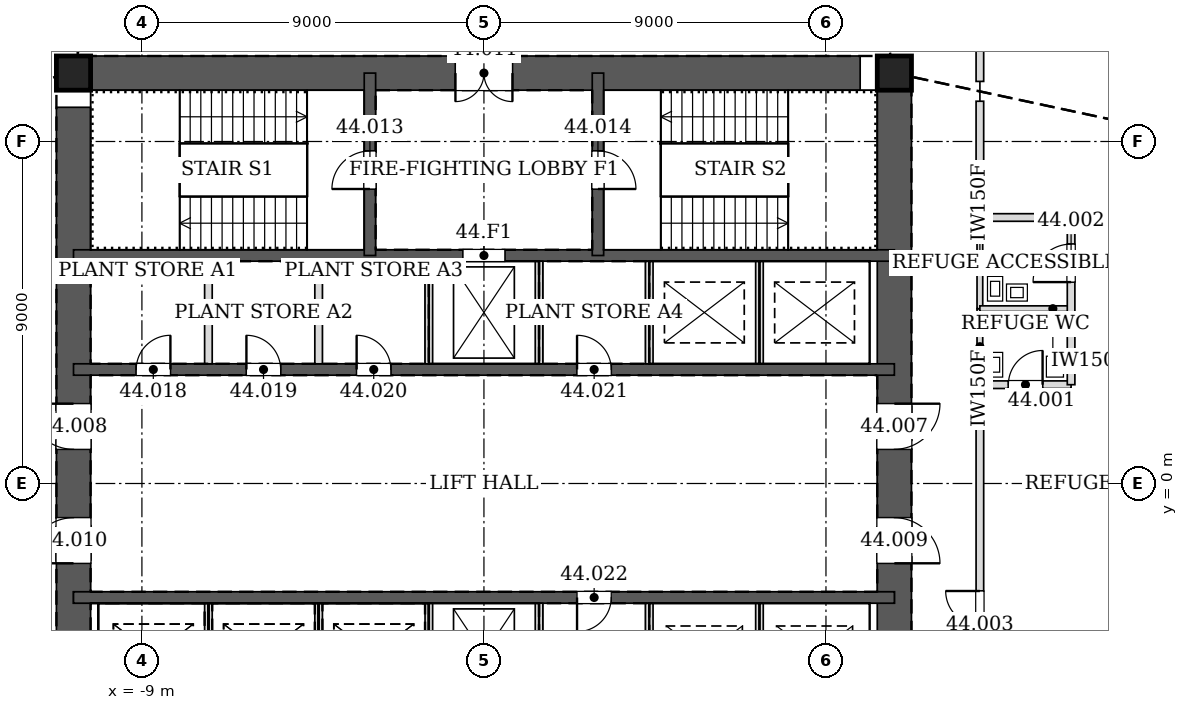
"""IFC4 building model, lengths in metres.
Left out: names, types, materials, properties, quantities, classifications, styles, units other than length and angle.
Written with IfcOpenShell. Run it as: python <this file> out.ifc"""

import sys

from ifc_helpers import new_model, si_unit, direction, frame, frame_2d, origin, origin_2d, place, context, subcontext, project, spatial, rectangle, hollow_rectangle, extrude, element, fill, save


model = new_model("IFC4")
c1 = context("Model", 3, precision=1e-05, world=origin(), true_north=direction((0.0, 1.0)))
c2 = subcontext(c1, "Body", "Model", "MODEL_VIEW")
j1 = project(units=[si_unit("LENGTHUNIT", "METRE"), si_unit("PLANEANGLEUNIT", "RADIAN")], contexts=[c1])
p1 = place(None, origin())
s1 = spatial("IfcSite", under=j1, at=p1, CompositionType="ELEMENT")
p2 = place(p1, origin())
s2 = spatial("IfcBuilding", under=s1, at=p2, CompositionType="ELEMENT")
p3 = place(p2, frame((0.0, 0.0, 193.5)))
s3 = spatial("IfcBuildingStorey", under=s2, at=p3, CompositionType="ELEMENT", Elevation=193.5)
for number, where, z_axis, x_axis in (
    (1, (10.8, 10.8, 0.0), (0.0, 0.0, 1.0), (1.0, 0.0, 0.0)),
    (2, (-10.8, 10.8, 0.0), (0.0, 0.0, 1.0), (1.0, 0.0, 0.0)),
):
    element("IfcColumn", number, at=place(p3, frame(where, z_axis=z_axis, x_axis=x_axis)), inside=s3, PredefinedType="COLUMN", context=c2, shape_type="SweptSolid", body=[
        extrude(hollow_rectangle(XDim=0.9, YDim=0.9, WallThickness=0.06, at=origin_2d()), origin(), (0.0, 0.0, 1.0), 4.5),
    ])
p4 = place(p3, frame((10.8, -10.8, 0.0), z_axis=(0.0, 0.0, 1.0), x_axis=(0.0, 1.0, 0.0)))
e3 = element("IfcWall", 3, at=p4, inside=s3, PredefinedType="SOLIDWALL", context=c2, shape_type="SweptSolid", body=[
    extrude(rectangle(XDim=21.6, YDim=0.9, at=frame_2d((10.8, 0.0))), origin(), (0.0, 0.0, 1.0), 4.5),
])
p5 = place(p4, frame((11.7, 0.0, 0.0)))
e4 = element("IfcOpeningElement", 4, at=p5, cuts=e3, PredefinedType="OPENING", context=c2, shape_type="SweptSolid", body=[
    extrude(rectangle(XDim=1.2, YDim=2.1, at=frame_2d((0.6, 1.05))), frame((0.0, 0.46, 0.0), z_axis=(0.0, -1.0, 0.0), x_axis=(1.0, 0.0, 0.0)), (0.0, 0.0, 1.0), 0.92),
])
p6 = place(p4, frame((8.7, 0.0, 0.0)))
e5 = element("IfcOpeningElement", 5, at=p6, cuts=e3, PredefinedType="OPENING", context=c2, shape_type="SweptSolid", body=[
    extrude(rectangle(XDim=1.2, YDim=2.1, at=frame_2d((0.6, 1.05))), frame((0.0, 0.46, 0.0), z_axis=(0.0, -1.0, 0.0), x_axis=(1.0, 0.0, 0.0)), (0.0, 0.0, 1.0), 0.92),
])
p7 = place(p3, frame((10.8, 10.8, 0.0), z_axis=(0.0, 0.0, 1.0), x_axis=(-1.0, 0.0, 0.0)))
e6 = element("IfcWall", 6, at=p7, inside=s3, PredefinedType="SOLIDWALL", context=c2, shape_type="SweptSolid", body=[
    extrude(rectangle(XDim=21.6, YDim=0.9, at=frame_2d((10.8, 0.0))), origin(), (0.0, 0.0, 1.0), 4.5),
])
p8 = place(p7, frame((10.05, 0.0, 0.0)))
e7 = element("IfcOpeningElement", 7, at=p8, cuts=e6, PredefinedType="OPENING", context=c2, shape_type="SweptSolid", body=[
    extrude(rectangle(XDim=1.5, YDim=2.1, at=frame_2d((0.75, 1.05))), frame((0.0, 0.46, 0.0), z_axis=(0.0, -1.0, 0.0), x_axis=(1.0, 0.0, 0.0)), (0.0, 0.0, 1.0), 0.92),
])
p9 = place(p3, frame((-10.8, 10.8, 0.0), z_axis=(0.0, 0.0, 1.0), x_axis=(0.0, -1.0, 0.0)))
e8 = element("IfcWall", 8, at=p9, inside=s3, PredefinedType="SOLIDWALL", context=c2, shape_type="SweptSolid", body=[
    extrude(rectangle(XDim=21.6, YDim=0.9, at=frame_2d((10.8, 0.0))), origin(), (0.0, 0.0, 1.0), 4.5),
])
p10 = place(p9, frame((8.7, 0.0, 0.0)))
e9 = element("IfcOpeningElement", 9, at=p10, cuts=e8, PredefinedType="OPENING", context=c2, shape_type="SweptSolid", body=[
    extrude(rectangle(XDim=1.2, YDim=2.1, at=frame_2d((0.6, 1.05))), frame((0.0, 0.46, 0.0), z_axis=(0.0, -1.0, 0.0), x_axis=(1.0, 0.0, 0.0)), (0.0, 0.0, 1.0), 0.92),
])
p11 = place(p9, frame((11.7, 0.0, 0.0)))
e10 = element("IfcOpeningElement", 10, at=p11, cuts=e8, PredefinedType="OPENING", context=c2, shape_type="SweptSolid", body=[
    extrude(rectangle(XDim=1.2, YDim=2.1, at=frame_2d((0.6, 1.05))), frame((0.0, 0.46, 0.0), z_axis=(0.0, -1.0, 0.0), x_axis=(1.0, 0.0, 0.0)), (0.0, 0.0, 1.0), 0.92),
])
p12 = place(p3, frame((-10.8, 3.0, 0.0), z_axis=(0.0, 0.0, 1.0), x_axis=(1.0, 0.0, 0.0)))
e11 = element("IfcWall", 11, at=p12, inside=s3, PredefinedType="SOLIDWALL", context=c2, shape_type="SweptSolid", body=[
    extrude(rectangle(XDim=21.6, YDim=0.3, at=frame_2d((10.8, 0.0))), origin(), (0.0, 0.0, 1.0), 4.5),
])
p13 = place(p12, frame((1.65, 0.0, 0.0)))
e12 = element("IfcOpeningElement", 12, at=p13, cuts=e11, PredefinedType="OPENING", context=c2, shape_type="SweptSolid", body=[
    extrude(rectangle(XDim=0.9, YDim=2.1, at=frame_2d((0.45, 1.05))), frame((0.0, 0.16, 0.0), z_axis=(0.0, -1.0, 0.0), x_axis=(1.0, 0.0, 0.0)), (0.0, 0.0, 1.0), 0.32),
])
p14 = place(p12, frame((4.55, 0.0, 0.0)))
e13 = element("IfcOpeningElement", 13, at=p14, cuts=e11, PredefinedType="OPENING", context=c2, shape_type="SweptSolid", body=[
    extrude(rectangle(XDim=0.9, YDim=2.1, at=frame_2d((0.45, 1.05))), frame((0.0, 0.16, 0.0), z_axis=(0.0, -1.0, 0.0), x_axis=(1.0, 0.0, 0.0)), (0.0, 0.0, 1.0), 0.32),
])
p15 = place(p12, frame((7.45, 0.0, 0.0)))
e14 = element("IfcOpeningElement", 14, at=p15, cuts=e11, PredefinedType="OPENING", context=c2, shape_type="SweptSolid", body=[
    extrude(rectangle(XDim=0.9, YDim=2.1, at=frame_2d((0.45, 1.05))), frame((0.0, 0.16, 0.0), z_axis=(0.0, -1.0, 0.0), x_axis=(1.0, 0.0, 0.0)), (0.0, 0.0, 1.0), 0.32),
])
p16 = place(p12, frame((13.25, 0.0, 0.0)))
e15 = element("IfcOpeningElement", 15, at=p16, cuts=e11, PredefinedType="OPENING", context=c2, shape_type="SweptSolid", body=[
    extrude(rectangle(XDim=0.9, YDim=2.1, at=frame_2d((0.45, 1.05))), frame((0.0, 0.16, 0.0), z_axis=(0.0, -1.0, 0.0), x_axis=(1.0, 0.0, 0.0)), (0.0, 0.0, 1.0), 0.32),
])
p17 = place(p3, frame((-10.8, 6.0, 0.0), z_axis=(0.0, 0.0, 1.0), x_axis=(1.0, 0.0, 0.0)))
e16 = element("IfcWall", 16, at=p17, inside=s3, PredefinedType="SOLIDWALL", context=c2, shape_type="SweptSolid", body=[
    extrude(rectangle(XDim=21.6, YDim=0.3, at=frame_2d((10.8, 0.0))), origin(), (0.0, 0.0, 1.0), 4.5),
])
p18 = place(p17, frame((10.25, 0.0, 0.0)))
e17 = element("IfcOpeningElement", 17, at=p18, cuts=e16, PredefinedType="OPENING", context=c2, shape_type="SweptSolid", body=[
    extrude(rectangle(XDim=1.1, YDim=2.1, at=frame_2d((0.55, 1.05))), frame((0.0, 0.16, 0.0), z_axis=(0.0, -1.0, 0.0), x_axis=(1.0, 0.0, 0.0)), (0.0, 0.0, 1.0), 0.32),
])
p19 = place(p3, frame((-3.0, 6.0, 0.0), z_axis=(0.0, 0.0, 1.0), x_axis=(0.0, 1.0, 0.0)))
e18 = element("IfcWall", 18, at=p19, inside=s3, PredefinedType="SOLIDWALL", context=c2, shape_type="SweptSolid", body=[
    extrude(rectangle(XDim=4.8, YDim=0.3, at=frame_2d((2.4, 0.0))), origin(), (0.0, 0.0, 1.0), 4.5),
])
p20 = place(p19, frame((1.75, 0.0, 0.0)))
e19 = element("IfcOpeningElement", 19, at=p20, cuts=e18, PredefinedType="OPENING", context=c2, shape_type="SweptSolid", body=[
    extrude(rectangle(XDim=1.0, YDim=2.1, at=frame_2d((0.5, 1.05))), frame((0.0, 0.16, 0.0), z_axis=(0.0, -1.0, 0.0), x_axis=(1.0, 0.0, 0.0)), (0.0, 0.0, 1.0), 0.32),
])
p21 = place(p3, frame((3.0, 6.0, 0.0), z_axis=(0.0, 0.0, 1.0), x_axis=(0.0, 1.0, 0.0)))
e20 = element("IfcWall", 20, at=p21, inside=s3, PredefinedType="SOLIDWALL", context=c2, shape_type="SweptSolid", body=[
    extrude(rectangle(XDim=4.8, YDim=0.3, at=frame_2d((2.4, 0.0))), origin(), (0.0, 0.0, 1.0), 4.5),
])
p22 = place(p21, frame((1.75, 0.0, 0.0)))
e21 = element("IfcOpeningElement", 21, at=p22, cuts=e20, PredefinedType="OPENING", context=c2, shape_type="SweptSolid", body=[
    extrude(rectangle(XDim=1.0, YDim=2.1, at=frame_2d((0.5, 1.05))), frame((0.0, 0.16, 0.0), z_axis=(0.0, -1.0, 0.0), x_axis=(1.0, 0.0, 0.0)), (0.0, 0.0, 1.0), 0.32),
])
p23 = place(p3, frame((-10.8, -3.0, 0.0), z_axis=(0.0, 0.0, 1.0), x_axis=(1.0, 0.0, 0.0)))
e22 = element("IfcWall", 22, at=p23, inside=s3, PredefinedType="SOLIDWALL", context=c2, shape_type="SweptSolid", body=[
    extrude(rectangle(XDim=21.6, YDim=0.3, at=frame_2d((10.8, 0.0))), origin(), (0.0, 0.0, 1.0), 2.7),
])
p24 = place(p23, frame((13.25, 0.0, 0.0)))
e23 = element("IfcOpeningElement", 23, at=p24, cuts=e22, PredefinedType="OPENING", context=c2, shape_type="SweptSolid", body=[
    extrude(rectangle(XDim=0.9, YDim=2.1, at=frame_2d((0.45, 1.05))), frame((0.0, 0.16, 0.0), z_axis=(0.0, -1.0, 0.0), x_axis=(1.0, 0.0, 0.0)), (0.0, 0.0, 1.0), 0.32),
])
p25 = place(p3, frame((-10.8, -3.0, 2.7), z_axis=(0.0, 0.0, 1.0), x_axis=(1.0, 0.0, 0.0)))
e24 = element("IfcWall", 24, at=p25, inside=s3, PredefinedType="SOLIDWALL", context=c2, shape_type="SweptSolid", body=[
    extrude(rectangle(XDim=21.6, YDim=0.3, at=frame_2d((10.8, 0.0))), origin(), (0.0, 0.0, 1.0), 1.8),
])
p26 = place(p3, frame((13.05, 2.599, 0.0), z_axis=(0.0, 0.0, 1.0), x_axis=(0.0, 1.0, 0.0)))
e25 = element("IfcWall", 25, at=p26, inside=s3, PredefinedType="PARTITIONING", context=c2, shape_type="SweptSolid", body=[
    extrude(rectangle(XDim=2.002, YDim=0.15, at=frame_2d((1.001, 0.0))), origin(), (0.0, 0.0, 1.0), 4.25),
])
p27 = place(p3, frame((13.05, 4.599, 0.0), z_axis=(0.0, 0.0, 1.0), x_axis=(0.0, 1.0, 0.0)))
e26 = element("IfcWall", 26, at=p27, inside=s3, PredefinedType="PARTITIONING", context=c2, shape_type="SweptSolid", body=[
    extrude(rectangle(XDim=2.402, YDim=0.15, at=frame_2d((1.201, 0.0))), origin(), (0.0, 0.0, 1.0), 4.25),
])
p28 = place(p3, frame((13.05, -10.579, 0.0), z_axis=(0.0, 0.0, 1.0), x_axis=(0.0, 1.0, 0.0)))
e27 = element("IfcWall", 27, at=p28, inside=s3, PredefinedType="PARTITIONING", context=c2, shape_type="SweptSolid", body=[
    extrude(rectangle(XDim=13.18, YDim=0.2, at=frame_2d((6.59, 0.0))), origin(), (0.0, 0.0, 1.0), 2.94),
])
p29 = place(p28, frame((5.95, 0.0, 0.0)))
e28 = element("IfcOpeningElement", 28, at=p29, cuts=e27, PredefinedType="OPENING", context=c2, shape_type="SweptSolid", body=[
    extrude(rectangle(XDim=1.8, YDim=2.4, at=frame_2d((0.9, 1.2))), frame((0.0, 0.11, 0.0), z_axis=(0.0, -1.0, 0.0), x_axis=(1.0, 0.0, 0.0)), (0.0, 0.0, 1.0), 0.22),
])
p30 = place(p3, frame((13.05, 6.999, 0.0), z_axis=(0.0, 0.0, 1.0), x_axis=(0.0, 1.0, 0.0)))
e29 = element("IfcWall", 29, at=p30, inside=s3, PredefinedType="PARTITIONING", context=c2, shape_type="SweptSolid", body=[
    extrude(rectangle(XDim=3.06, YDim=0.2, at=frame_2d((1.53, 0.0))), origin(), (0.0, 0.0, 1.0), 3.44),
])
p31 = place(p3, frame((13.05, 10.581, 0.0), z_axis=(0.0, 0.0, 1.0), x_axis=(0.0, 1.0, 0.0)))
e30 = element("IfcWall", 30, at=p31, inside=s3, PredefinedType="PARTITIONING", context=c2, shape_type="SweptSolid", body=[
    extrude(rectangle(XDim=2.469, YDim=0.2, at=frame_2d((1.235, 0.0))), origin(), (0.0, 0.0, 1.0), 3.229),
])
p32 = place(p3, frame((15.45, 4.6, 0.0), z_axis=(0.0, 0.0, 1.0), x_axis=(-1.0, 0.0, 0.0)))
e31 = element("IfcWall", 31, at=p32, inside=s3, PredefinedType="PARTITIONING", context=c2, shape_type="SweptSolid", body=[
    extrude(rectangle(XDim=2.4, YDim=0.15, at=frame_2d((1.2, 0.0))), origin(), (0.0, 0.0, 1.0), 3.478),
])
p33 = place(p3, frame((13.05, 2.6, 0.0), z_axis=(0.0, 0.0, 1.0), x_axis=(1.0, 0.0, 0.0)))
e32 = element("IfcWall", 32, at=p33, inside=s3, PredefinedType="PARTITIONING", context=c2, shape_type="SweptSolid", body=[
    extrude(rectangle(XDim=2.4, YDim=0.2, at=frame_2d((1.2, 0.0))), origin(), (0.0, 0.0, 1.0), 3.478),
])
p34 = place(p33, frame((0.75, 0.0, 0.0)))
e33 = element("IfcOpeningElement", 33, at=p34, cuts=e32, PredefinedType="OPENING", context=c2, shape_type="SweptSolid", body=[
    extrude(rectangle(XDim=0.9, YDim=2.1, at=frame_2d((0.45, 1.05))), frame((0.0, 0.11, 0.0), z_axis=(0.0, -1.0, 0.0), x_axis=(1.0, 0.0, 0.0)), (0.0, 0.0, 1.0), 0.22),
])
p35 = place(p3, frame((15.45, 2.6, 0.0), z_axis=(0.0, 0.0, 1.0), x_axis=(0.0, 1.0, 0.0)))
e34 = element("IfcWall", 34, at=p35, inside=s3, PredefinedType="PARTITIONING", context=c2, shape_type="SweptSolid", body=[
    extrude(rectangle(XDim=4.4, YDim=0.2, at=frame_2d((2.2, 0.0))), origin(), (0.0, 0.0, 1.0), 4.25),
])
p36 = place(p35, frame((2.7, 0.0, 0.0)))
e35 = element("IfcOpeningElement", 35, at=p36, cuts=e34, PredefinedType="OPENING", context=c2, shape_type="SweptSolid", body=[
    extrude(rectangle(XDim=1.0, YDim=2.1, at=frame_2d((0.5, 1.05))), frame((0.0, 0.11, 0.0), z_axis=(0.0, -1.0, 0.0), x_axis=(1.0, 0.0, 0.0)), (0.0, 0.0, 1.0), 0.22),
])
p37 = place(p3, frame((15.45, 7.0, 0.0), z_axis=(0.0, 0.0, 1.0), x_axis=(-1.0, 0.0, 0.0)))
e36 = element("IfcWall", 36, at=p37, inside=s3, PredefinedType="PARTITIONING", context=c2, shape_type="SweptSolid", body=[
    extrude(rectangle(XDim=2.4, YDim=0.2, at=frame_2d((1.2, 0.0))), origin(), (0.0, 0.0, 1.0), 3.478),
])
for number, where, z_axis, x_axis in (
    (37, (-7.25, 3.15, 0.0), (0.0, 0.0, 1.0), (0.0, 1.0, 0.0)),
    (38, (-4.35, 3.15, 0.0), (0.0, 0.0, 1.0), (0.0, 1.0, 0.0)),
    (39, (-1.45, 3.15, 0.0), (0.0, 0.0, 1.0), (0.0, 1.0, 0.0)),
    (40, (1.45, 3.15, 0.0), (0.0, 0.0, 1.0), (0.0, 1.0, 0.0)),
    (41, (4.35, 3.15, 0.0), (0.0, 0.0, 1.0), (0.0, 1.0, 0.0)),
):
    element("IfcWall", number, at=place(p3, frame(where, z_axis=z_axis, x_axis=x_axis)), inside=s3, PredefinedType="PARTITIONING", context=c2, shape_type="SweptSolid", body=[
        extrude(rectangle(XDim=2.7, YDim=0.2, at=frame_2d((1.35, 0.0))), origin(), (0.0, 0.0, 1.0), 4.25),
    ])
for number, where, z_axis, x_axis in (
    (42, (7.25, 3.15, 0.0), (0.0, 0.0, 1.0), (0.0, 1.0, 0.0)),
    (43, (-7.25, -5.85, 0.0), (0.0, 0.0, 1.0), (0.0, 1.0, 0.0)),
    (44, (-4.35, -5.85, 0.0), (0.0, 0.0, 1.0), (0.0, 1.0, 0.0)),
    (45, (-1.45, -5.85, 0.0), (0.0, 0.0, 1.0), (0.0, 1.0, 0.0)),
):
    element("IfcWall", number, at=place(p3, frame(where, z_axis=z_axis, x_axis=x_axis)), inside=s3, PredefinedType="PARTITIONING", context=c2, shape_type="SweptSolid", body=[
        extrude(rectangle(XDim=2.7, YDim=0.2, at=frame_2d((1.35, 0.0))), origin(), (0.0, 0.0, 1.0), 4.5),
    ])
for number, where, z_axis, x_axis in (
    (46, (1.45, -5.85, 0.0), (0.0, 0.0, 1.0), (0.0, 1.0, 0.0)),
    (47, (4.35, -5.85, 0.0), (0.0, 0.0, 1.0), (0.0, 1.0, 0.0)),
):
    element("IfcWall", number, at=place(p3, frame(where, z_axis=z_axis, x_axis=x_axis)), inside=s3, PredefinedType="PARTITIONING", context=c2, shape_type="SweptSolid", body=[
        extrude(rectangle(XDim=2.7, YDim=0.2, at=frame_2d((1.35, 0.0))), origin(), (0.0, 0.0, 1.0), 4.25),
    ])
p38 = place(p3, frame((7.25, -5.85, 0.0), z_axis=(0.0, 0.0, 1.0), x_axis=(0.0, 1.0, 0.0)))
e48 = element("IfcWall", 48, at=p38, inside=s3, PredefinedType="PARTITIONING", context=c2, shape_type="SweptSolid", body=[
    extrude(rectangle(XDim=2.7, YDim=0.2, at=frame_2d((1.35, 0.0))), origin(), (0.0, 0.0, 1.0), 4.5),
])
p39 = place(p34, origin())
e49 = element("IfcDoor", 49, at=p39, inside=s3, OperationType="SINGLE_SWING_RIGHT", PredefinedType="DOOR", context=c2, shape_type="SweptSolid", body=[
    extrude(rectangle(XDim=0.9, YDim=2.1, at=frame_2d((0.45, 1.05))), frame((0.0, 0.025, 0.0), z_axis=(0.0, -1.0, 0.0), x_axis=(1.0, 0.0, 0.0)), (0.0, 0.0, 1.0), 0.05),
])
fill(e33, e49)
p40 = place(p36, origin())
e50 = element("IfcDoor", 50, at=p40, inside=s3, OperationType="SINGLE_SWING_LEFT", PredefinedType="DOOR", context=c2, shape_type="SweptSolid", body=[
    extrude(rectangle(XDim=1.0, YDim=2.1, at=frame_2d((0.5, 1.05))), frame((0.0, 0.025, 0.0), z_axis=(0.0, -1.0, 0.0), x_axis=(1.0, 0.0, 0.0)), (0.0, 0.0, 1.0), 0.05),
])
fill(e35, e50)
p41 = place(p29, origin())
e51 = element("IfcDoor", 51, at=p41, inside=s3, OperationType="DOUBLE_DOOR_SINGLE_SWING", PredefinedType="DOOR", context=c2, shape_type="SweptSolid", body=[
    extrude(rectangle(XDim=1.8, YDim=2.4, at=frame_2d((0.9, 1.2))), frame((0.0, 0.025, 0.0), z_axis=(0.0, -1.0, 0.0), x_axis=(1.0, 0.0, 0.0)), (0.0, 0.0, 1.0), 0.05),
])
fill(e28, e51)
p42 = place(p5, frame((1.2, 0.0, 0.0), z_axis=(0.0, 0.0, 1.0), x_axis=(-1.0, 0.0, 0.0)))
e52 = element("IfcDoor", 52, at=p42, inside=s3, OperationType="SINGLE_SWING_LEFT", PredefinedType="DOOR", context=c2, shape_type="SweptSolid", body=[
    extrude(rectangle(XDim=1.2, YDim=2.1, at=frame_2d((0.6, 1.05))), frame((0.0, 0.025, 0.0), z_axis=(0.0, -1.0, 0.0), x_axis=(1.0, 0.0, 0.0)), (0.0, 0.0, 1.0), 0.05),
])
fill(e4, e52)
p43 = place(p10, frame((1.2, 0.0, 0.0), z_axis=(0.0, 0.0, 1.0), x_axis=(-1.0, 0.0, 0.0)))
e53 = element("IfcDoor", 53, at=p43, inside=s3, OperationType="SINGLE_SWING_RIGHT", PredefinedType="DOOR", context=c2, shape_type="SweptSolid", body=[
    extrude(rectangle(XDim=1.2, YDim=2.1, at=frame_2d((0.6, 1.05))), frame((0.0, 0.025, 0.0), z_axis=(0.0, -1.0, 0.0), x_axis=(1.0, 0.0, 0.0)), (0.0, 0.0, 1.0), 0.05),
])
fill(e9, e53)
p44 = place(p6, frame((1.2, 0.0, 0.0), z_axis=(0.0, 0.0, 1.0), x_axis=(-1.0, 0.0, 0.0)))
e54 = element("IfcDoor", 54, at=p44, inside=s3, OperationType="SINGLE_SWING_RIGHT", PredefinedType="DOOR", context=c2, shape_type="SweptSolid", body=[
    extrude(rectangle(XDim=1.2, YDim=2.1, at=frame_2d((0.6, 1.05))), frame((0.0, 0.025, 0.0), z_axis=(0.0, -1.0, 0.0), x_axis=(1.0, 0.0, 0.0)), (0.0, 0.0, 1.0), 0.05),
])
fill(e5, e54)
p45 = place(p11, frame((1.2, 0.0, 0.0), z_axis=(0.0, 0.0, 1.0), x_axis=(-1.0, 0.0, 0.0)))
e55 = element("IfcDoor", 55, at=p45, inside=s3, OperationType="SINGLE_SWING_LEFT", PredefinedType="DOOR", context=c2, shape_type="SweptSolid", body=[
    extrude(rectangle(XDim=1.2, YDim=2.1, at=frame_2d((0.6, 1.05))), frame((0.0, 0.025, 0.0), z_axis=(0.0, -1.0, 0.0), x_axis=(1.0, 0.0, 0.0)), (0.0, 0.0, 1.0), 0.05),
])
fill(e10, e55)
p46 = place(p8, origin())
e56 = element("IfcDoor", 56, at=p46, inside=s3, OperationType="DOUBLE_DOOR_SINGLE_SWING", PredefinedType="DOOR", context=c2, shape_type="SweptSolid", body=[
    extrude(rectangle(XDim=1.5, YDim=2.1, at=frame_2d((0.75, 1.05))), frame((0.0, 0.025, 0.0), z_axis=(0.0, -1.0, 0.0), x_axis=(1.0, 0.0, 0.0)), (0.0, 0.0, 1.0), 0.05),
])
fill(e7, e56)
p47 = place(p20, origin())
e57 = element("IfcDoor", 57, at=p47, inside=s3, OperationType="SINGLE_SWING_LEFT", PredefinedType="DOOR", context=c2, shape_type="SweptSolid", body=[
    extrude(rectangle(XDim=1.0, YDim=2.1, at=frame_2d((0.5, 1.05))), frame((0.0, 0.025, 0.0), z_axis=(0.0, -1.0, 0.0), x_axis=(1.0, 0.0, 0.0)), (0.0, 0.0, 1.0), 0.05),
])
fill(e19, e57)
p48 = place(p22, frame((1.0, 0.0, 0.0), z_axis=(0.0, 0.0, 1.0), x_axis=(-1.0, 0.0, 0.0)))
e58 = element("IfcDoor", 58, at=p48, inside=s3, OperationType="SINGLE_SWING_RIGHT", PredefinedType="DOOR", context=c2, shape_type="SweptSolid", body=[
    extrude(rectangle(XDim=1.0, YDim=2.1, at=frame_2d((0.5, 1.05))), frame((0.0, 0.025, 0.0), z_axis=(0.0, -1.0, 0.0), x_axis=(1.0, 0.0, 0.0)), (0.0, 0.0, 1.0), 0.05),
])
fill(e21, e58)
p49 = place(p13, origin())
e59 = element("IfcDoor", 59, at=p49, inside=s3, OperationType="SINGLE_SWING_RIGHT", PredefinedType="DOOR", context=c2, shape_type="SweptSolid", body=[
    extrude(rectangle(XDim=0.9, YDim=2.1, at=frame_2d((0.45, 1.05))), frame((0.0, 0.025, 0.0), z_axis=(0.0, -1.0, 0.0), x_axis=(1.0, 0.0, 0.0)), (0.0, 0.0, 1.0), 0.05),
])
fill(e12, e59)
p50 = place(p14, origin())
e60 = element("IfcDoor", 60, at=p50, inside=s3, OperationType="SINGLE_SWING_LEFT", PredefinedType="DOOR", context=c2, shape_type="SweptSolid", body=[
    extrude(rectangle(XDim=0.9, YDim=2.1, at=frame_2d((0.45, 1.05))), frame((0.0, 0.025, 0.0), z_axis=(0.0, -1.0, 0.0), x_axis=(1.0, 0.0, 0.0)), (0.0, 0.0, 1.0), 0.05),
])
fill(e13, e60)
p51 = place(p15, origin())
e61 = element("IfcDoor", 61, at=p51, inside=s3, OperationType="SINGLE_SWING_LEFT", PredefinedType="DOOR", context=c2, shape_type="SweptSolid", body=[
    extrude(rectangle(XDim=0.9, YDim=2.1, at=frame_2d((0.45, 1.05))), frame((0.0, 0.025, 0.0), z_axis=(0.0, -1.0, 0.0), x_axis=(1.0, 0.0, 0.0)), (0.0, 0.0, 1.0), 0.05),
])
fill(e14, e61)
p52 = place(p16, origin())
e62 = element("IfcDoor", 62, at=p52, inside=s3, OperationType="SINGLE_SWING_LEFT", PredefinedType="DOOR", context=c2, shape_type="SweptSolid", body=[
    extrude(rectangle(XDim=0.9, YDim=2.1, at=frame_2d((0.45, 1.05))), frame((0.0, 0.025, 0.0), z_axis=(0.0, -1.0, 0.0), x_axis=(1.0, 0.0, 0.0)), (0.0, 0.0, 1.0), 0.05),
])
fill(e15, e62)
p53 = place(p24, frame((0.9, 0.0, 0.0), z_axis=(0.0, 0.0, 1.0), x_axis=(-1.0, 0.0, 0.0)))
e63 = element("IfcDoor", 63, at=p53, inside=s3, OperationType="SINGLE_SWING_RIGHT", PredefinedType="DOOR", context=c2, shape_type="SweptSolid", body=[
    extrude(rectangle(XDim=0.9, YDim=2.1, at=frame_2d((0.45, 1.05))), frame((0.0, 0.025, 0.0), z_axis=(0.0, -1.0, 0.0), x_axis=(1.0, 0.0, 0.0)), (0.0, 0.0, 1.0), 0.05),
])
fill(e23, e63)
p54 = place(p18, origin())
e64 = element("IfcDoor", 64, at=p54, inside=s3, OperationType="DOUBLE_DOOR_SLIDING", PredefinedType="DOOR", context=c2, shape_type="SweptSolid", body=[
    extrude(rectangle(XDim=1.1, YDim=2.1, at=frame_2d((0.55, 1.05))), frame((0.0, 0.025, 0.0), z_axis=(0.0, -1.0, 0.0), x_axis=(1.0, 0.0, 0.0)), (0.0, 0.0, 1.0), 0.05),
])
fill(e17, e64)
save(model, sys.argv[1])
